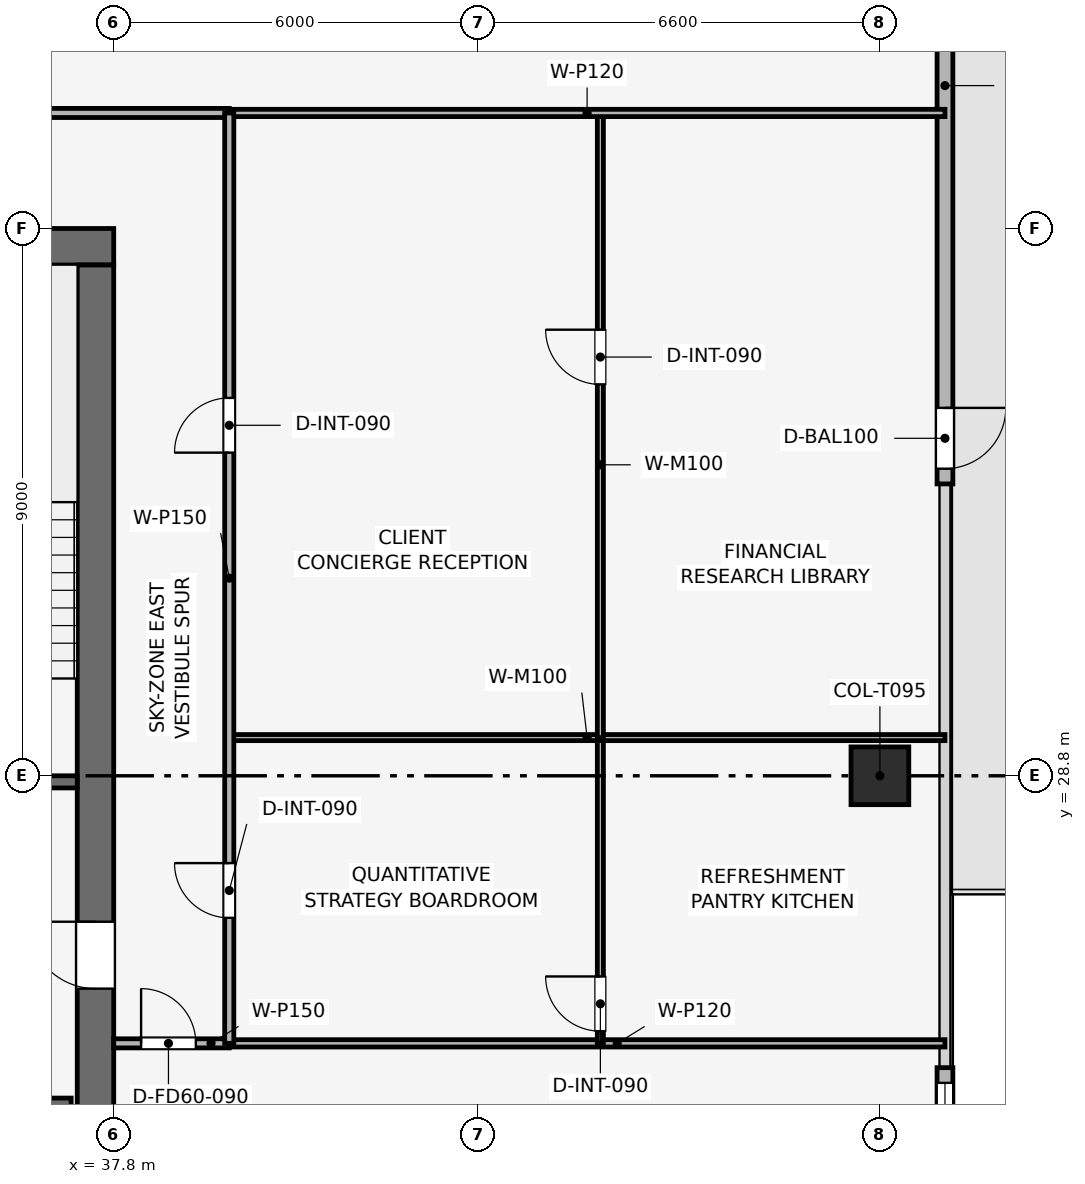
"""IFC4 building model, lengths in metres.
Left out: names, types, materials, properties, quantities, classifications, styles, units other than length and angle.
Written with IfcOpenShell. Run it as: python <this file> out.ifc"""

import sys

from ifc_helpers import new_model, si_unit, direction, frame, frame_2d, origin, origin_2d, place, context, subcontext, project, spatial, rectangle, extrude, element, fill, save


model = new_model("IFC4")
c1 = context("Model", 3, precision=1e-05, world=origin(), true_north=direction((0.0, 1.0)))
c2 = subcontext(c1, "Body", "Model", "MODEL_VIEW")
j1 = project(units=[si_unit("LENGTHUNIT", "METRE"), si_unit("PLANEANGLEUNIT", "RADIAN")], contexts=[c1])
p1 = place(None, origin())
s1 = spatial("IfcSite", under=j1, at=p1, CompositionType="ELEMENT")
p2 = place(p1, origin())
s2 = spatial("IfcBuilding", under=s1, at=p2, CompositionType="ELEMENT")
p3 = place(p2, frame((0.0, 0.0, 306.75)))
s3 = spatial("IfcBuildingStorey", under=s2, at=p3, CompositionType="ELEMENT", Elevation=306.75)
p4 = place(p3, frame((19.8, 37.5, 0.0), z_axis=(0.0, 0.0, 1.0), x_axis=(1.0, 0.0, 0.0)))
e1 = element("IfcWall", 1, at=p4, inside=s3, PredefinedType="SHEAR", context=c2, shape_type="SweptSolid", body=[
    extrude(rectangle(XDim=18.0, YDim=0.6, at=frame_2d((9.0, 0.0))), origin(), (0.0, 0.0, 1.0), 3.75),
])
p5 = place(p4, frame((7.05, 0.0, 0.0)))
e2 = element("IfcOpeningElement", 2, at=p5, cuts=e1, PredefinedType="OPENING", context=c2, shape_type="SweptSolid", body=[
    extrude(rectangle(XDim=1.1, YDim=2.15, at=frame_2d((0.55, 1.075))), frame((0.0, 0.31, 0.0), z_axis=(0.0, -1.0, 0.0), x_axis=(1.0, 0.0, 0.0)), (0.0, 0.0, 1.0), 0.62),
])
p6 = place(p3, frame((37.5, 20.4, 0.0), z_axis=(0.0, 0.0, 1.0), x_axis=(0.0, 1.0, 0.0)))
e3 = element("IfcWall", 3, at=p6, inside=s3, PredefinedType="SHEAR", context=c2, shape_type="SweptSolid", body=[
    extrude(rectangle(XDim=16.8, YDim=0.6, at=frame_2d((8.4, 0.0))), origin(), (0.0, 0.0, 1.0), 3.75),
])
p7 = place(p6, frame((4.9, 0.0, 0.0)))
e4 = element("IfcOpeningElement", 4, at=p7, cuts=e3, PredefinedType="OPENING", context=c2, shape_type="SweptSolid", body=[
    extrude(rectangle(XDim=1.1, YDim=2.15, at=frame_2d((0.55, 1.075))), frame((0.0, 0.31, 0.0), z_axis=(0.0, -1.0, 0.0), x_axis=(1.0, 0.0, 0.0)), (0.0, 0.0, 1.0), 0.62),
])
p8 = place(p3, frame((50.4, 28.8, 0.003), z_axis=(0.0, 0.0, 1.0), x_axis=(1.0, 0.0, 0.0)))
e5 = element("IfcColumn", 5, at=p8, inside=s3, PredefinedType="COLUMN", context=c2, shape_type="SweptSolid", body=[
    extrude(rectangle(XDim=0.95, YDim=0.95, at=origin_2d()), origin(), (0.0, 0.0, 1.0), 3.504),
])
p9 = place(p3, frame((51.47, 45.3, 0.0), z_axis=(0.0, 0.0, 1.0), x_axis=(0.0, -1.0, 0.0)))
e6 = element("IfcWall", 6, at=p9, inside=s3, PredefinedType="SOLIDWALL", context=c2, shape_type="SweptSolid", body=[
    extrude(rectangle(XDim=11.7, YDim=0.26, at=frame_2d((5.85, 0.0))), origin(), (0.0, 0.0, 1.0), 3.51),
])
p10 = place(p9, frame((10.45, 0.0, 0.0)))
e7 = element("IfcOpeningElement", 7, at=p10, cuts=e6, PredefinedType="OPENING", context=c2, shape_type="SweptSolid", body=[
    extrude(rectangle(XDim=1.0, YDim=2.2, at=frame_2d((0.5, 1.1))), frame((0.0, 0.14, 0.0), z_axis=(0.0, -1.0, 0.0), x_axis=(1.0, 0.0, 0.0)), (0.0, 0.0, 1.0), 0.28),
])
p11 = place(p3, frame((51.47, 24.0, 0.0), z_axis=(0.0, 0.0, 1.0), x_axis=(0.0, -1.0, 0.0)))
e8 = element("IfcWall", 8, at=p11, inside=s3, PredefinedType="SOLIDWALL", context=c2, shape_type="SweptSolid", body=[
    extrude(rectangle(XDim=11.7, YDim=0.26, at=frame_2d((5.85, 0.0))), origin(), (0.0, 0.0, 1.0), 3.51),
])
p12 = place(p11, frame((0.25, 0.0, 0.9)))
e9 = element("IfcOpeningElement", 9, at=p12, cuts=e8, PredefinedType="OPENING", context=c2, shape_type="SweptSolid", body=[
    extrude(rectangle(XDim=1.2, YDim=2.1, at=frame_2d((0.6, 1.05))), frame((0.0, 0.14, 0.0), z_axis=(0.0, -1.0, 0.0), x_axis=(1.0, 0.0, 0.0)), (0.0, 0.0, 1.0), 0.28),
])
p13 = place(p3, frame((34.05, 28.7, 0.0), z_axis=(0.0, 0.0, 1.0), x_axis=(1.0, 0.0, 0.0)))
e10 = element("IfcWall", 10, at=p13, inside=s3, PredefinedType="SHEAR", context=c2, shape_type="SweptSolid", body=[
    extrude(rectangle(XDim=3.15, YDim=0.2, at=frame_2d((1.575, 0.0))), origin(), (0.0, 0.0, 1.0), 3.51),
])
p14 = place(p13, frame((0.8, 0.0, 0.0)))
e11 = element("IfcOpeningElement", 11, at=p14, cuts=e10, PredefinedType="OPENING", context=c2, shape_type="SweptSolid", body=[
    extrude(rectangle(XDim=1.0, YDim=2.1, at=frame_2d((0.5, 1.05))), frame((0.0, 0.11, 0.0), z_axis=(0.0, -1.0, 0.0), x_axis=(1.0, 0.0, 0.0)), (0.0, 0.0, 1.0), 0.22),
])
p15 = place(p3, frame((34.05, 23.4, 0.0), z_axis=(0.0, 0.0, 1.0), x_axis=(1.0, 0.0, 0.0)))
e12 = element("IfcWall", 12, at=p15, inside=s3, PredefinedType="SHEAR", context=c2, shape_type="SweptSolid", body=[
    extrude(rectangle(XDim=3.05, YDim=0.2, at=frame_2d((1.525, 0.0))), origin(), (0.0, 0.0, 1.0), 3.51),
])
p16 = place(p15, frame((1.2, 0.0, 0.0)))
e13 = element("IfcOpeningElement", 13, at=p16, cuts=e12, PredefinedType="OPENING", context=c2, shape_type="SweptSolid", body=[
    extrude(rectangle(XDim=1.1, YDim=2.15, at=frame_2d((0.55, 1.075))), frame((0.0, 0.11, 0.0), z_axis=(0.0, -1.0, 0.0), x_axis=(1.0, 0.0, 0.0)), (0.0, 0.0, 1.0), 0.22),
])
p17 = place(p3, frame((37.8, 24.4, 0.0), z_axis=(0.0, 0.0, 1.0), x_axis=(1.0, 0.0, 0.0)))
e14 = element("IfcWall", 14, at=p17, inside=s3, PredefinedType="PARTITIONING", context=c2, shape_type="SweptSolid", body=[
    extrude(rectangle(XDim=1.9, YDim=0.15, at=frame_2d((0.95, 0.0))), origin(), (0.0, 0.0, 1.0), 3.51),
])
p18 = place(p17, frame((0.45, 0.0, 0.0)))
e15 = element("IfcOpeningElement", 15, at=p18, cuts=e14, PredefinedType="OPENING", context=c2, shape_type="SweptSolid", body=[
    extrude(rectangle(XDim=0.9, YDim=2.1, at=frame_2d((0.45, 1.05))), frame((0.0, 0.085, 0.0), z_axis=(0.0, -1.0, 0.0), x_axis=(1.0, 0.0, 0.0)), (0.0, 0.0, 1.0), 0.17),
])
p19 = place(p3, frame((39.7, 24.4, 0.0), z_axis=(0.0, 0.0, 1.0), x_axis=(1.0, 0.0, 0.0)))
e16 = element("IfcWall", 16, at=p19, inside=s3, PredefinedType="PARTITIONING", context=c2, shape_type="SweptSolid", body=[
    extrude(rectangle(XDim=11.77, YDim=0.12, at=frame_2d((5.885, 0.0))), origin(), (0.0, 0.0, 1.0), 3.135),
])
p20 = place(p3, frame((45.803, 24.4, 0.0), z_axis=(0.0, 0.0, 1.0), x_axis=(0.0, 1.0, 0.0)))
e17 = element("IfcWall", 17, at=p20, inside=s3, PredefinedType="MOVABLE", context=c2, shape_type="SweptSolid", body=[
    extrude(rectangle(XDim=5.028, YDim=0.1, at=frame_2d((2.514, 0.0))), origin(), (0.0, 0.0, 1.0), 3.095),
])
p21 = place(p20, frame((0.2, 0.0, 0.0)))
e18 = element("IfcOpeningElement", 18, at=p21, cuts=e17, PredefinedType="OPENING", context=c2, shape_type="SweptSolid", body=[
    extrude(rectangle(XDim=0.9, YDim=2.1, at=frame_2d((0.45, 1.05))), frame((0.0, 0.06, 0.0), z_axis=(0.0, -1.0, 0.0), x_axis=(1.0, 0.0, 0.0)), (0.0, 0.0, 1.0), 0.12),
])
p22 = place(p3, frame((39.7, 29.428, 0.0), z_axis=(0.0, 0.0, 1.0), x_axis=(1.0, 0.0, 0.0)))
e19 = element("IfcWall", 19, at=p22, inside=s3, PredefinedType="MOVABLE", context=c2, shape_type="SweptSolid", body=[
    extrude(rectangle(XDim=11.77, YDim=0.1, at=frame_2d((5.885, 0.0))), origin(), (0.0, 0.0, 1.0), 3.135),
])
p23 = place(p3, frame((45.803, 29.428, 0.0), z_axis=(0.0, 0.0, 1.0), x_axis=(0.0, 1.0, 0.0)))
e20 = element("IfcWall", 20, at=p23, inside=s3, PredefinedType="MOVABLE", context=c2, shape_type="SweptSolid", body=[
    extrude(rectangle(XDim=10.272, YDim=0.1, at=frame_2d((5.136, 0.0))), origin(), (0.0, 0.0, 1.0), 3.095),
])
p24 = place(p23, frame((5.808, 0.0, 0.0)))
e21 = element("IfcOpeningElement", 21, at=p24, cuts=e20, PredefinedType="OPENING", context=c2, shape_type="SweptSolid", body=[
    extrude(rectangle(XDim=0.9, YDim=2.1, at=frame_2d((0.45, 1.05))), frame((0.0, 0.06, 0.0), z_axis=(0.0, -1.0, 0.0), x_axis=(1.0, 0.0, 0.0)), (0.0, 0.0, 1.0), 0.12),
])
p25 = place(p3, frame((39.7, 39.7, 0.0), z_axis=(0.0, 0.0, 1.0), x_axis=(1.0, 0.0, 0.0)))
e22 = element("IfcWall", 22, at=p25, inside=s3, PredefinedType="PARTITIONING", context=c2, shape_type="SweptSolid", body=[
    extrude(rectangle(XDim=11.77, YDim=0.12, at=frame_2d((5.885, 0.0))), origin(), (0.0, 0.0, 1.0), 3.095),
])
p26 = place(p3, frame((17.9, 39.7, 0.0), z_axis=(0.0, 0.0, 1.0), x_axis=(1.0, 0.0, 0.0)))
e23 = element("IfcWall", 23, at=p26, inside=s3, PredefinedType="PARTITIONING", context=c2, shape_type="SweptSolid", body=[
    extrude(rectangle(XDim=21.8, YDim=0.15, at=frame_2d((10.9, 0.0))), origin(), (0.0, 0.0, 1.0), 3.095),
])
p27 = place(p26, frame((1.302, 0.0, 0.0)))
e24 = element("IfcOpeningElement", 24, at=p27, cuts=e23, PredefinedType="OPENING", context=c2, shape_type="SweptSolid", body=[
    extrude(rectangle(XDim=0.9, YDim=2.1, at=frame_2d((0.45, 1.05))), frame((0.0, 0.085, 0.0), z_axis=(0.0, -1.0, 0.0), x_axis=(1.0, 0.0, 0.0)), (0.0, 0.0, 1.0), 0.17),
])
p28 = place(p26, frame((12.202, 0.0, 0.0)))
e25 = element("IfcOpeningElement", 25, at=p28, cuts=e23, PredefinedType="OPENING", context=c2, shape_type="SweptSolid", body=[
    extrude(rectangle(XDim=0.9, YDim=2.1, at=frame_2d((0.45, 1.05))), frame((0.0, 0.085, 0.0), z_axis=(0.0, -1.0, 0.0), x_axis=(1.0, 0.0, 0.0)), (0.0, 0.0, 1.0), 0.17),
])
p29 = place(p3, frame((39.7, 24.4, 0.0), z_axis=(0.0, 0.0, 1.0), x_axis=(0.0, 1.0, 0.0)))
e26 = element("IfcWall", 26, at=p29, inside=s3, PredefinedType="PARTITIONING", context=c2, shape_type="SweptSolid", body=[
    extrude(rectangle(XDim=15.3, YDim=0.15, at=frame_2d((7.65, 0.0))), origin(), (0.0, 0.0, 1.0), 3.095),
])
p30 = place(p29, frame((2.064, 0.0, 0.0)))
e27 = element("IfcOpeningElement", 27, at=p30, cuts=e26, PredefinedType="OPENING", context=c2, shape_type="SweptSolid", body=[
    extrude(rectangle(XDim=0.9, YDim=2.1, at=frame_2d((0.45, 1.05))), frame((0.0, 0.085, 0.0), z_axis=(0.0, -1.0, 0.0), x_axis=(1.0, 0.0, 0.0)), (0.0, 0.0, 1.0), 0.17),
])
p31 = place(p29, frame((9.714, 0.0, 0.0)))
e28 = element("IfcOpeningElement", 28, at=p31, cuts=e26, PredefinedType="OPENING", context=c2, shape_type="SweptSolid", body=[
    extrude(rectangle(XDim=0.9, YDim=2.1, at=frame_2d((0.45, 1.05))), frame((0.0, 0.085, 0.0), z_axis=(0.0, -1.0, 0.0), x_axis=(1.0, 0.0, 0.0)), (0.0, 0.0, 1.0), 0.17),
])
p32 = place(p10, origin())
e29 = element("IfcDoor", 29, at=p32, inside=s3, OperationType="SINGLE_SWING_LEFT", PredefinedType="DOOR", context=c2, shape_type="SweptSolid", body=[
    extrude(rectangle(XDim=1.0, YDim=2.2, at=frame_2d((0.5, 1.1))), frame((0.0, 0.025, 0.0), z_axis=(0.0, -1.0, 0.0), x_axis=(1.0, 0.0, 0.0)), (0.0, 0.0, 1.0), 0.05),
])
fill(e7, e29)
p33 = place(p12, origin())
e30 = element("IfcWindow", 30, at=p33, inside=s3, PartitioningType="SINGLE_PANEL", PredefinedType="WINDOW", context=c2, shape_type="SweptSolid", body=[
    extrude(rectangle(XDim=1.2, YDim=2.1, at=frame_2d((0.6, 1.05))), frame((0.0, 0.03, 0.0), z_axis=(0.0, -1.0, 0.0), x_axis=(1.0, 0.0, 0.0)), (0.0, 0.0, 1.0), 0.06),
])
fill(e9, e30)
p34 = place(p18, origin())
e31 = element("IfcDoor", 31, at=p34, inside=s3, OperationType="SINGLE_SWING_LEFT", PredefinedType="DOOR", context=c2, shape_type="SweptSolid", body=[
    extrude(rectangle(XDim=0.9, YDim=2.1, at=frame_2d((0.45, 1.05))), frame((0.0, 0.025, 0.0), z_axis=(0.0, -1.0, 0.0), x_axis=(1.0, 0.0, 0.0)), (0.0, 0.0, 1.0), 0.05),
])
fill(e15, e31)
p35 = place(p21, origin())
e32 = element("IfcDoor", 32, at=p35, inside=s3, OperationType="SINGLE_SWING_RIGHT", PredefinedType="DOOR", context=c2, shape_type="SweptSolid", body=[
    extrude(rectangle(XDim=0.9, YDim=2.1, at=frame_2d((0.45, 1.05))), frame((0.0, 0.025, 0.0), z_axis=(0.0, -1.0, 0.0), x_axis=(1.0, 0.0, 0.0)), (0.0, 0.0, 1.0), 0.05),
])
fill(e18, e32)
p36 = place(p24, origin())
e33 = element("IfcDoor", 33, at=p36, inside=s3, OperationType="SINGLE_SWING_RIGHT", PredefinedType="DOOR", context=c2, shape_type="SweptSolid", body=[
    extrude(rectangle(XDim=0.9, YDim=2.1, at=frame_2d((0.45, 1.05))), frame((0.0, 0.025, 0.0), z_axis=(0.0, -1.0, 0.0), x_axis=(1.0, 0.0, 0.0)), (0.0, 0.0, 1.0), 0.05),
])
fill(e21, e33)
p37 = place(p30, origin())
e34 = element("IfcDoor", 34, at=p37, inside=s3, OperationType="SINGLE_SWING_RIGHT", PredefinedType="DOOR", context=c2, shape_type="SweptSolid", body=[
    extrude(rectangle(XDim=0.9, YDim=2.1, at=frame_2d((0.45, 1.05))), frame((0.0, 0.025, 0.0), z_axis=(0.0, -1.0, 0.0), x_axis=(1.0, 0.0, 0.0)), (0.0, 0.0, 1.0), 0.05),
])
fill(e27, e34)
p38 = place(p31, origin())
e35 = element("IfcDoor", 35, at=p38, inside=s3, OperationType="SINGLE_SWING_LEFT", PredefinedType="DOOR", context=c2, shape_type="SweptSolid", body=[
    extrude(rectangle(XDim=0.9, YDim=2.1, at=frame_2d((0.45, 1.05))), frame((0.0, 0.025, 0.0), z_axis=(0.0, -1.0, 0.0), x_axis=(1.0, 0.0, 0.0)), (0.0, 0.0, 1.0), 0.05),
])
fill(e28, e35)
p39 = place(p7, origin())
e36 = element("IfcDoor", 36, at=p39, inside=s3, OperationType="SINGLE_SWING_RIGHT", PredefinedType="DOOR", context=c2, shape_type="SweptSolid", body=[
    extrude(rectangle(XDim=1.1, YDim=2.15, at=frame_2d((0.55, 1.075))), frame((0.0, 0.025, 0.0), z_axis=(0.0, -1.0, 0.0), x_axis=(1.0, 0.0, 0.0)), (0.0, 0.0, 1.0), 0.05),
])
fill(e4, e36)
save(model, sys.argv[1])
